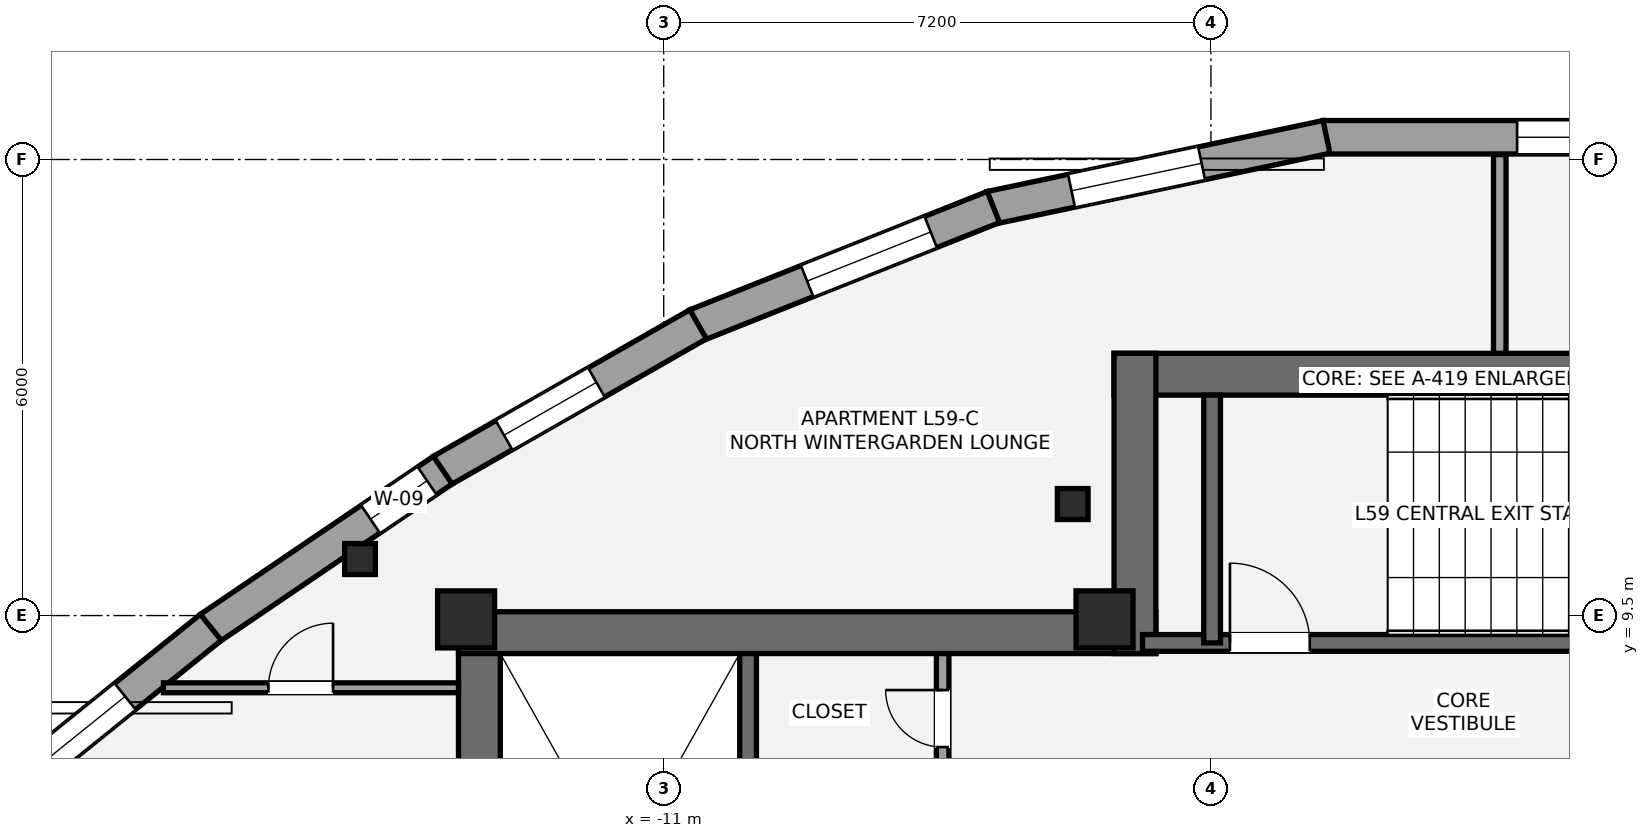
"""IFC4 building model, lengths in metres.
Left out: names, types, materials, properties, quantities, classifications, styles, units other than length and angle.
Written with IfcOpenShell. Run it as: python <this file> out.ifc"""

import sys

from ifc_helpers import new_model, si_unit, direction, frame, frame_2d, origin, origin_2d, place, context, subcontext, project, spatial, rectangle, i_section, extrude, element, fill, save


model = new_model("IFC4")
c1 = context("Model", 3, precision=1e-05, world=origin(), true_north=direction((0.0, 1.0)))
c2 = subcontext(c1, "Body", "Model", "MODEL_VIEW")
j1 = project(units=[si_unit("LENGTHUNIT", "METRE"), si_unit("PLANEANGLEUNIT", "RADIAN")], contexts=[c1])
p1 = place(None, origin())
s1 = spatial("IfcSite", under=j1, at=p1, CompositionType="ELEMENT")
p2 = place(p1, origin())
s2 = spatial("IfcBuilding", under=s1, at=p2, CompositionType="ELEMENT")
p3 = place(p2, frame((0.0, 0.0, 213.15)))
s3 = spatial("IfcBuildingStorey", under=s2, at=p3, CompositionType="ELEMENT", Elevation=213.15)
p4 = place(p3, frame((-13.425, 1.3, 0.0), z_axis=(0.0, 0.0, 1.0), x_axis=(0.0, 1.0, 0.0)))
e1 = element("IfcWall", 1, at=p4, inside=s3, PredefinedType="SHEAR", context=c2, shape_type="SweptSolid", body=[
    extrude(rectangle(XDim=8.25, YDim=0.55, at=frame_2d((4.125, 0.0))), origin(), (0.0, 0.0, 1.0), 3.15),
])
p5 = place(p3, frame((-13.7, 9.275, 0.0), z_axis=(0.0, 0.0, 1.0), x_axis=(1.0, 0.0, 0.0)))
e2 = element("IfcWall", 2, at=p5, inside=s3, PredefinedType="SHEAR", context=c2, shape_type="SweptSolid", body=[
    extrude(rectangle(XDim=9.175, YDim=0.55, at=frame_2d((4.587, 0.0))), origin(), (0.0, 0.0, 1.0), 3.15),
])
p6 = place(p3, frame((-9.89, 1.85, 0.0), z_axis=(0.0, 0.0, 1.0), x_axis=(0.0, 1.0, 0.0)))
e3 = element("IfcWall", 3, at=p6, inside=s3, PredefinedType="SHEAR", context=c2, shape_type="SweptSolid", body=[
    extrude(rectangle(XDim=7.15, YDim=0.22, at=frame_2d((3.575, 0.0))), origin(), (0.0, 0.0, 1.0), 3.15),
])
p7 = place(p3, frame((-5.075, 12.675, 0.0), z_axis=(0.0, 0.0, 1.0), x_axis=(1.0, 0.0, 0.0)))
e4 = element("IfcWall", 4, at=p7, inside=s3, PredefinedType="SHEAR", context=c2, shape_type="SweptSolid", body=[
    extrude(rectangle(XDim=10.15, YDim=0.55, at=frame_2d((5.075, 0.0))), origin(), (0.0, 0.0, 1.0), 3.15),
])
p8 = place(p3, frame((-4.8, 9.0, 0.0), z_axis=(0.0, 0.0, 1.0), x_axis=(0.0, 1.0, 0.0)))
e5 = element("IfcWall", 5, at=p8, inside=s3, PredefinedType="SHEAR", context=c2, shape_type="SweptSolid", body=[
    extrude(rectangle(XDim=3.95, YDim=0.55, at=frame_2d((1.975, 0.0))), origin(), (0.0, 0.0, 1.0), 3.15),
])
p9 = place(p3, frame((-4.7, 9.14, 0.0), z_axis=(0.0, 0.0, 1.0), x_axis=(1.0, 0.0, 0.0)))
e6 = element("IfcWall", 6, at=p9, inside=s3, PredefinedType="SHEAR", context=c2, shape_type="SweptSolid", body=[
    extrude(rectangle(XDim=9.3, YDim=0.22, at=frame_2d((4.65, 0.0))), origin(), (0.0, 0.0, 1.0), 3.15),
])
p10 = place(p9, frame((1.15, 0.0, 0.0)))
e7 = element("IfcOpeningElement", 7, at=p10, cuts=e6, PredefinedType="OPENING", context=c2, shape_type="SweptSolid", body=[
    extrude(rectangle(XDim=1.05, YDim=2.15, at=frame_2d((0.525, 1.075))), frame((0.0, 0.12, 0.0), z_axis=(0.0, -1.0, 0.0), x_axis=(1.0, 0.0, 0.0)), (0.0, 0.0, 1.0), 0.24),
])
p11 = place(p3, frame((-3.785, 9.14, 0.0), z_axis=(0.0, 0.0, 1.0), x_axis=(0.0, 1.0, 0.0)))
e8 = element("IfcWall", 8, at=p11, inside=s3, PredefinedType="SHEAR", context=c2, shape_type="SweptSolid", body=[
    extrude(rectangle(XDim=3.26, YDim=0.22, at=frame_2d((1.63, 0.0))), origin(), (0.0, 0.0, 1.0), 3.15),
])
for number, where, z_axis, x_axis in (
    (9, (-13.6, 9.45, 0.0), (0.0, 0.0, 1.0), (1.0, 0.0, 0.0)),
    (10, (-5.2, 9.45, 0.0), (0.0, 0.0, 1.0), (1.0, 0.0, 0.0)),
):
    element("IfcColumn", number, at=place(p3, frame(where, z_axis=z_axis, x_axis=x_axis)), inside=s3, PredefinedType="PILASTER", context=c2, shape_type="SweptSolid", body=[
        extrude(rectangle(XDim=0.75, YDim=0.75, at=origin_2d()), origin(), (0.0, 0.0, 1.0), 3.15),
    ])
for number, where, z_axis, x_axis in (
    (11, (-5.619, 10.967, 0.0), (0.0, 0.0, 1.0), (1.0, 0.0, 0.0)),
    (12, (-14.996, 10.244, 0.0), (0.0, 0.0, 1.0), (1.0, 0.0, 0.0)),
):
    element("IfcColumn", number, at=place(p3, frame(where, z_axis=z_axis, x_axis=x_axis)), inside=s3, PredefinedType="COLUMN", context=c2, shape_type="SweptSolid", body=[
        extrude(i_section(OverallWidth=0.404, OverallDepth=0.407, WebThickness=0.027, FlangeThickness=0.044, at=origin_2d()), origin(), (0.0, 0.0, 1.0), 3.15),
    ])
p12 = place(p3, frame((-2.325, 15.793, 0.0), z_axis=(0.0, 0.0, 1.0), x_axis=(1.0, 0.0, 0.0)))
e13 = element("IfcWall", 13, at=p12, inside=s3, PredefinedType="STANDARD", context=c2, shape_type="SweptSolid", body=[
    extrude(rectangle(XDim=4.65, YDim=0.44, at=frame_2d((2.325, 0.0))), origin(), (0.0, 0.0, 1.0), 2.336),
])
p13 = place(p12, frame((2.553, 0.0, 0.55)))
e14 = element("IfcOpeningElement", 14, at=p13, cuts=e13, PredefinedType="OPENING", context=c2, shape_type="SweptSolid", body=[
    extrude(rectangle(XDim=1.75, YDim=1.55, at=frame_2d((0.875, 0.775))), frame((0.0, 0.23, 0.0), z_axis=(0.0, -1.0, 0.0), x_axis=(1.0, 0.0, 0.0)), (0.0, 0.0, 1.0), 0.46),
])
p14 = place(p3, frame((-6.699, 14.864, 0.0), z_axis=(0.0, 0.0, 1.0), x_axis=(0.97840271225, 0.206707843737, 0.0)))
e15 = element("IfcWall", 15, at=p14, inside=s3, PredefinedType="STANDARD", context=c2, shape_type="SweptSolid", body=[
    extrude(rectangle(XDim=4.517, YDim=0.44, at=frame_2d((2.258, 0.0))), origin(), (0.0, 0.0, 1.0), 2.336),
])
p15 = place(p14, frame((1.087, 0.0, 0.55)))
e16 = element("IfcOpeningElement", 16, at=p15, cuts=e15, PredefinedType="OPENING", context=c2, shape_type="SweptSolid", body=[
    extrude(rectangle(XDim=1.75, YDim=1.55, at=frame_2d((0.875, 0.775))), frame((0.0, 0.23, 0.0), z_axis=(0.0, -1.0, 0.0), x_axis=(1.0, 0.0, 0.0)), (0.0, 0.0, 1.0), 0.46),
])
p16 = place(p3, frame((-10.576, 13.318, 0.0), z_axis=(0.0, 0.0, 1.0), x_axis=(0.929170765931, 0.369650764558, 0.0)))
e17 = element("IfcWall", 17, at=p16, inside=s3, PredefinedType="STANDARD", context=c2, shape_type="SweptSolid", body=[
    extrude(rectangle(XDim=4.211, YDim=0.44, at=frame_2d((2.105, 0.0))), origin(), (0.0, 0.0, 1.0), 2.336),
])
p17 = place(p16, frame((1.574, 0.0, 0.55)))
e18 = element("IfcOpeningElement", 18, at=p17, cuts=e17, PredefinedType="OPENING", context=c2, shape_type="SweptSolid", body=[
    extrude(rectangle(XDim=1.75, YDim=1.55, at=frame_2d((0.875, 0.775))), frame((0.0, 0.23, 0.0), z_axis=(0.0, -1.0, 0.0), x_axis=(1.0, 0.0, 0.0)), (0.0, 0.0, 1.0), 0.46),
])
p18 = place(p3, frame((-13.922, 11.405, 0.0), z_axis=(0.0, 0.0, 1.0), x_axis=(0.868339797426, 0.495969753317, 0.0)))
e19 = element("IfcWall", 19, at=p18, inside=s3, PredefinedType="STANDARD", context=c2, shape_type="SweptSolid", body=[
    extrude(rectangle(XDim=3.885, YDim=0.44, at=frame_2d((1.943, 0.0))), origin(), (0.0, 0.0, 1.0), 2.336),
])
p19 = place(p18, frame((0.945, 0.0, 0.55)))
e20 = element("IfcOpeningElement", 20, at=p19, cuts=e19, PredefinedType="OPENING", context=c2, shape_type="SweptSolid", body=[
    extrude(rectangle(XDim=1.4, YDim=1.55, at=frame_2d((0.7, 0.775))), frame((0.0, 0.23, 0.0), z_axis=(0.0, -1.0, 0.0), x_axis=(1.0, 0.0, 0.0)), (0.0, 0.0, 1.0), 0.46),
])
p20 = place(p3, frame((-16.973, 9.334, 0.0), z_axis=(0.0, 0.0, 1.0), x_axis=(0.827592777121, 0.561328954586, 0.0)))
e21 = element("IfcWall", 21, at=p20, inside=s3, PredefinedType="STANDARD", context=c2, shape_type="SweptSolid", body=[
    extrude(rectangle(XDim=3.704, YDim=0.44, at=frame_2d((1.852, 0.0))), origin(), (0.0, 0.0, 1.0), 2.336),
])
p21 = place(p20, frame((2.555, 0.0, 0.58)))
e22 = element("IfcOpeningElement", 22, at=p21, cuts=e21, PredefinedType="OPENING", context=c2, shape_type="SweptSolid", body=[
    extrude(rectangle(XDim=0.9, YDim=1.35, at=frame_2d((0.45, 0.675))), frame((0.0, 0.23, 0.0), z_axis=(0.0, -1.0, 0.0), x_axis=(1.0, 0.0, 0.0)), (0.0, 0.0, 1.0), 0.46),
])
p22 = place(p3, frame((-19.8, 7.057, 0.0), z_axis=(0.0, 0.0, 1.0), x_axis=(0.778794775864, 0.627278803314, 0.0)))
e23 = element("IfcWall", 23, at=p22, inside=s3, PredefinedType="STANDARD", context=c2, shape_type="SweptSolid", body=[
    extrude(rectangle(XDim=3.648, YDim=0.44, at=frame_2d((1.824, 0.0))), origin(), (0.0, 0.0, 1.0), 2.336),
])
p23 = place(p22, frame((0.45, 0.0, 0.55)))
e24 = element("IfcOpeningElement", 24, at=p23, cuts=e23, PredefinedType="OPENING", context=c2, shape_type="SweptSolid", body=[
    extrude(rectangle(XDim=1.75, YDim=1.55, at=frame_2d((0.875, 0.775))), frame((0.0, 0.23, 0.0), z_axis=(0.0, -1.0, 0.0), x_axis=(1.0, 0.0, 0.0)), (0.0, 0.0, 1.0), 0.46),
])
p24 = place(p3, frame((-7.33, 7.42, 0.0), z_axis=(0.0, 0.0, 1.0), x_axis=(0.0, 1.0, 0.0)))
e25 = element("IfcWall", 25, at=p24, inside=s3, PredefinedType="PARTITIONING", context=c2, shape_type="SweptSolid", body=[
    extrude(rectangle(XDim=1.58, YDim=0.165, at=frame_2d((0.79, 0.0))), origin(), (0.0, 0.0, 1.0), 2.97),
])
p25 = place(p24, frame((0.35, 0.0, 0.0)))
e26 = element("IfcOpeningElement", 26, at=p25, cuts=e25, PredefinedType="OPENING", context=c2, shape_type="SweptSolid", body=[
    extrude(rectangle(XDim=0.75, YDim=2.1, at=frame_2d((0.375, 1.05))), frame((0.0, 0.093, 0.0), z_axis=(0.0, -1.0, 0.0), x_axis=(1.0, 0.0, 0.0)), (0.0, 0.0, 1.0), 0.185),
])
p26 = place(p3, frame((0.0, 12.95, 0.0), z_axis=(0.0, 0.0, 1.0), x_axis=(0.0, 1.0, 0.0)))
e27 = element("IfcWall", 27, at=p26, inside=s3, PredefinedType="PARTITIONING", context=c2, shape_type="SweptSolid", body=[
    extrude(rectangle(XDim=2.615, YDim=0.165, at=frame_2d((1.307, 0.0))), origin(), (0.0, 0.0, 1.0), 2.97),
])
p27 = place(p3, frame((-17.582, 8.55, 0.0), z_axis=(0.0, 0.0, 1.0), x_axis=(1.0, 0.0, 0.0)))
e28 = element("IfcWall", 28, at=p27, inside=s3, PredefinedType="PARTITIONING", context=c2, shape_type="SweptSolid", body=[
    extrude(rectangle(XDim=3.882, YDim=0.13, at=frame_2d((1.941, 0.0))), origin(), (0.0, 0.0, 1.0), 2.423),
])
p28 = place(p27, frame((1.381, 0.0, 0.0)))
e29 = element("IfcOpeningElement", 29, at=p28, cuts=e28, PredefinedType="OPENING", context=c2, shape_type="SweptSolid", body=[
    extrude(rectangle(XDim=0.85, YDim=2.1, at=frame_2d((0.425, 1.05))), frame((0.0, 0.075, 0.0), z_axis=(0.0, -1.0, 0.0), x_axis=(1.0, 0.0, 0.0)), (0.0, 0.0, 1.0), 0.15),
])
p29 = place(p13, origin())
e30 = element("IfcWindow", 30, at=p29, inside=s3, PartitioningType="SINGLE_PANEL", PredefinedType="WINDOW", context=c2, shape_type="SweptSolid", body=[
    extrude(rectangle(XDim=1.75, YDim=1.55, at=frame_2d((0.875, 0.775))), frame((0.0, -0.01, 0.0), z_axis=(0.0, -1.0, 0.0), x_axis=(1.0, 0.0, 0.0)), (0.0, 0.0, 1.0), 0.06),
])
fill(e14, e30)
p30 = place(p15, origin())
e31 = element("IfcWindow", 31, at=p30, inside=s3, PartitioningType="SINGLE_PANEL", PredefinedType="WINDOW", context=c2, shape_type="SweptSolid", body=[
    extrude(rectangle(XDim=1.75, YDim=1.55, at=frame_2d((0.875, 0.775))), frame((0.0, -0.01, 0.0), z_axis=(0.0, -1.0, 0.0), x_axis=(1.0, 0.0, 0.0)), (0.0, 0.0, 1.0), 0.06),
])
fill(e16, e31)
p31 = place(p17, origin())
e32 = element("IfcWindow", 32, at=p31, inside=s3, PartitioningType="SINGLE_PANEL", PredefinedType="WINDOW", context=c2, shape_type="SweptSolid", body=[
    extrude(rectangle(XDim=1.75, YDim=1.55, at=frame_2d((0.875, 0.775))), frame((0.0, -0.01, 0.0), z_axis=(0.0, -1.0, 0.0), x_axis=(1.0, 0.0, 0.0)), (0.0, 0.0, 1.0), 0.06),
])
fill(e18, e32)
p32 = place(p19, origin())
e33 = element("IfcWindow", 33, at=p32, inside=s3, PartitioningType="SINGLE_PANEL", PredefinedType="WINDOW", context=c2, shape_type="SweptSolid", body=[
    extrude(rectangle(XDim=1.4, YDim=1.55, at=frame_2d((0.7, 0.775))), frame((0.0, -0.01, 0.0), z_axis=(0.0, -1.0, 0.0), x_axis=(1.0, 0.0, 0.0)), (0.0, 0.0, 1.0), 0.06),
])
fill(e20, e33)
p33 = place(p21, origin())
e34 = element("IfcWindow", 34, at=p33, inside=s3, PartitioningType="SINGLE_PANEL", PredefinedType="WINDOW", context=c2, shape_type="SweptSolid", body=[
    extrude(rectangle(XDim=0.9, YDim=1.35, at=frame_2d((0.45, 0.675))), frame((0.0, -0.01, 0.0), z_axis=(0.0, -1.0, 0.0), x_axis=(1.0, 0.0, 0.0)), (0.0, 0.0, 1.0), 0.06),
])
fill(e22, e34)
p34 = place(p23, origin())
e35 = element("IfcWindow", 35, at=p34, inside=s3, PartitioningType="SINGLE_PANEL", PredefinedType="WINDOW", context=c2, shape_type="SweptSolid", body=[
    extrude(rectangle(XDim=1.75, YDim=1.55, at=frame_2d((0.875, 0.775))), frame((0.0, -0.01, 0.0), z_axis=(0.0, -1.0, 0.0), x_axis=(1.0, 0.0, 0.0)), (0.0, 0.0, 1.0), 0.06),
])
fill(e24, e35)
p35 = place(p10, origin())
e36 = element("IfcDoor", 36, at=p35, inside=s3, OperationType="SINGLE_SWING_LEFT", PredefinedType="DOOR", context=c2, shape_type="SweptSolid", body=[
    extrude(rectangle(XDim=1.05, YDim=2.15, at=frame_2d((0.525, 1.075))), frame((0.0, 0.025, 0.0), z_axis=(0.0, -1.0, 0.0), x_axis=(1.0, 0.0, 0.0)), (0.0, 0.0, 1.0), 0.05),
])
fill(e7, e36)
p36 = place(p25, origin())
e37 = element("IfcDoor", 37, at=p36, inside=s3, OperationType="SINGLE_SWING_RIGHT", PredefinedType="DOOR", context=c2, shape_type="SweptSolid", body=[
    extrude(rectangle(XDim=0.75, YDim=2.1, at=frame_2d((0.375, 1.05))), frame((0.0, 0.025, 0.0), z_axis=(0.0, -1.0, 0.0), x_axis=(1.0, 0.0, 0.0)), (0.0, 0.0, 1.0), 0.05),
])
fill(e26, e37)
p37 = place(p28, origin())
e38 = element("IfcDoor", 38, at=p37, inside=s3, OperationType="SINGLE_SWING_RIGHT", PredefinedType="DOOR", context=c2, shape_type="SweptSolid", body=[
    extrude(rectangle(XDim=0.85, YDim=2.1, at=frame_2d((0.425, 1.05))), frame((0.0, 0.025, 0.0), z_axis=(0.0, -1.0, 0.0), x_axis=(1.0, 0.0, 0.0)), (0.0, 0.0, 1.0), 0.05),
])
fill(e29, e38)
save(model, sys.argv[1])
